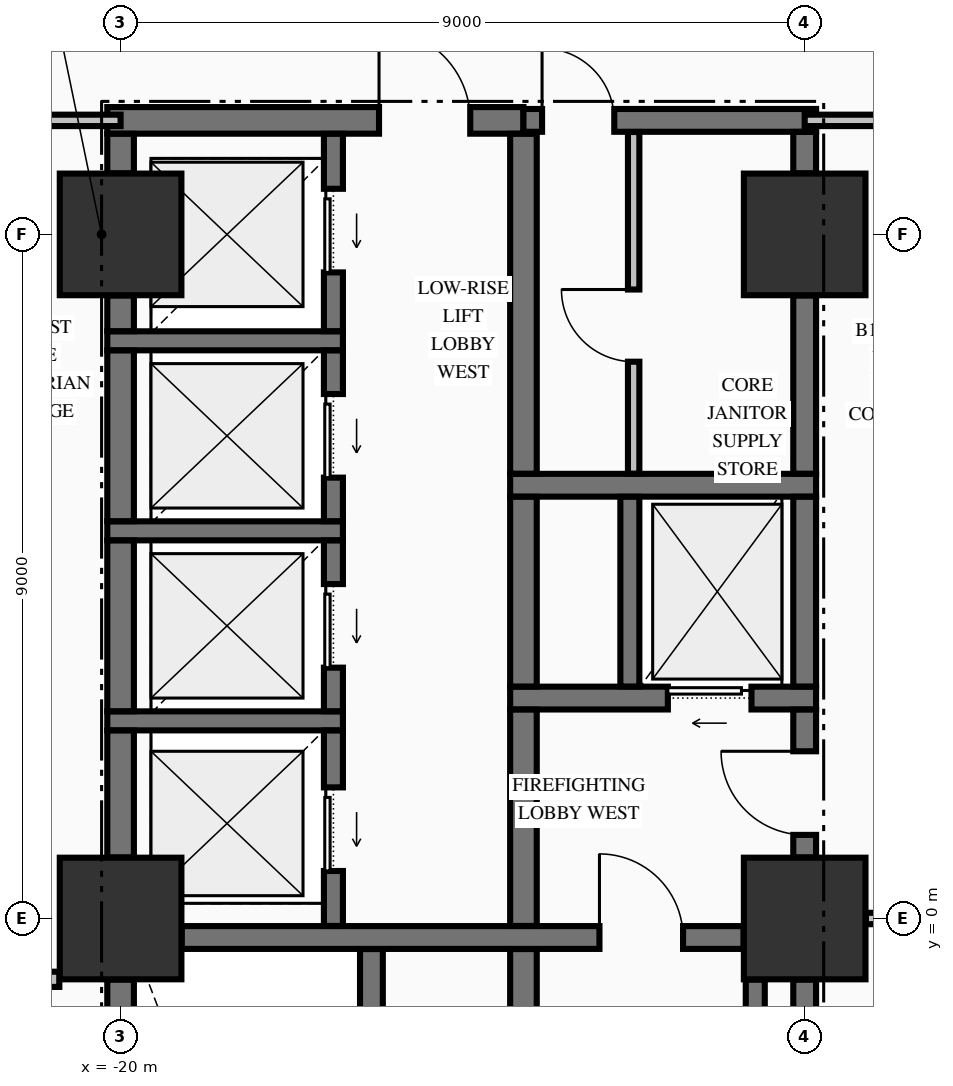
"""IFC4 building model, lengths in metres.
Left out: names, types, materials, properties, quantities, classifications, styles, units other than length and angle.
Written with IfcOpenShell. Run it as: python <this file> out.ifc"""

import sys

from ifc_helpers import new_model, si_unit, direction, frame, frame_2d, origin, origin_2d, place, context, subcontext, project, spatial, rectangle, extrude, element, fill, save


model = new_model("IFC4")
c1 = context("Model", 3, precision=1e-05, world=origin(), true_north=direction((0.0, 1.0)))
c2 = subcontext(c1, "Body", "Model", "MODEL_VIEW")
j1 = project(units=[si_unit("LENGTHUNIT", "METRE"), si_unit("PLANEANGLEUNIT", "RADIAN")], contexts=[c1])
p1 = place(None, origin())
s1 = spatial("IfcSite", under=j1, at=p1, CompositionType="ELEMENT")
p2 = place(p1, origin())
s2 = spatial("IfcBuilding", under=s1, at=p2, CompositionType="ELEMENT")
p3 = place(p2, frame((0.0, 0.0, -4.55)))
s3 = spatial("IfcBuildingStorey", under=s2, at=p3, CompositionType="ELEMENT", Elevation=-4.55)
for number, where, z_axis, x_axis in (
    (1, (-20.0, 0.0, 0.0), (0.0, 0.0, 1.0), (1.0, 0.0, 0.0)),
    (2, (-20.0, 9.0, 0.0), (0.0, 0.0, 1.0), (1.0, 0.0, 0.0)),
    (3, (-11.0, 0.0, 0.0), (0.0, 0.0, 1.0), (1.0, 0.0, 0.0)),
    (4, (-11.0, 9.0, 0.0), (0.0, 0.0, 1.0), (1.0, 0.0, 0.0)),
):
    element("IfcColumn", number, at=place(p3, frame(where, z_axis=z_axis, x_axis=x_axis)), inside=s3, PredefinedType="COLUMN", context=c2, shape_type="SweptSolid", body=[
        extrude(rectangle(XDim=1.6, YDim=1.6, at=origin_2d()), origin(), (0.0, 0.0, 1.0), 4.2),
    ])
p4 = place(p3, frame((-19.196, -0.25, 0.0), z_axis=(0.0, 0.0, 1.0), x_axis=(1.0, 0.0, 0.0)))
e5 = element("IfcWall", 5, at=p4, inside=s3, PredefinedType="SHEAR", context=c2, shape_type="SweptSolid", body=[
    extrude(rectangle(XDim=7.392, YDim=0.3, at=frame_2d((3.696, 0.0))), origin(), (0.0, 0.0, 1.0), 4.2),
])
p5 = place(p4, frame((5.496, 0.0, 0.0)))
e6 = element("IfcOpeningElement", 6, at=p5, cuts=e5, PredefinedType="OPENING", context=c2, shape_type="SweptSolid", body=[
    extrude(rectangle(XDim=1.1, YDim=2.15, at=frame_2d((0.55, 1.075))), frame((0.0, 0.16, 0.0), z_axis=(0.0, -1.0, 0.0), x_axis=(1.0, 0.0, 0.0)), (0.0, 0.0, 1.0), 0.32),
])
p6 = place(p3, frame((-20.175, 2.6, 0.0), z_axis=(0.0, 0.0, 1.0), x_axis=(1.0, 0.0, 0.0)))
e7 = element("IfcWall", 7, at=p6, inside=s3, PredefinedType="SOLIDWALL", context=c2, shape_type="SweptSolid", body=[
    extrude(rectangle(XDim=3.1, YDim=0.25, at=frame_2d((1.55, 0.0))), origin(), (0.0, 0.0, 1.0), 4.2),
])
p7 = place(p3, frame((-14.875, 2.9, 0.0), z_axis=(0.0, 0.0, 1.0), x_axis=(1.0, 0.0, 0.0)))
e8 = element("IfcWall", 8, at=p7, inside=s3, PredefinedType="SHEAR", context=c2, shape_type="SweptSolid", body=[
    extrude(rectangle(XDim=4.025, YDim=0.3, at=frame_2d((2.012, 0.0))), origin(), (0.0, 0.0, 1.0), 4.2),
])
p8 = place(p7, frame((2.075, 0.0, 0.0)))
e9 = element("IfcOpeningElement", 9, at=p8, cuts=e8, PredefinedType="OPENING", context=c2, shape_type="SweptSolid", body=[
    extrude(rectangle(XDim=1.1, YDim=2.2, at=frame_2d((0.55, 1.1))), frame((0.0, 0.16, 0.0), z_axis=(0.0, -1.0, 0.0), x_axis=(1.0, 0.0, 0.0)), (0.0, 0.0, 1.0), 0.32),
])
p9 = place(p3, frame((-20.175, 5.1, 0.0), z_axis=(0.0, 0.0, 1.0), x_axis=(1.0, 0.0, 0.0)))
e10 = element("IfcWall", 10, at=p9, inside=s3, PredefinedType="SOLIDWALL", context=c2, shape_type="SweptSolid", body=[
    extrude(rectangle(XDim=3.1, YDim=0.25, at=frame_2d((1.55, 0.0))), origin(), (0.0, 0.0, 1.0), 4.2),
])
p10 = place(p3, frame((-14.875, 5.7, 0.0), z_axis=(0.0, 0.0, 1.0), x_axis=(1.0, 0.0, 0.0)))
e11 = element("IfcWall", 11, at=p10, inside=s3, PredefinedType="SHEAR", context=c2, shape_type="SweptSolid", body=[
    extrude(rectangle(XDim=4.025, YDim=0.3, at=frame_2d((2.012, 0.0))), origin(), (0.0, 0.0, 1.0), 4.2),
])
p11 = place(p3, frame((-20.175, 7.6, 0.0), z_axis=(0.0, 0.0, 1.0), x_axis=(1.0, 0.0, 0.0)))
e12 = element("IfcWall", 12, at=p11, inside=s3, PredefinedType="SOLIDWALL", context=c2, shape_type="SweptSolid", body=[
    extrude(rectangle(XDim=3.1, YDim=0.25, at=frame_2d((1.55, 0.0))), origin(), (0.0, 0.0, 1.0), 4.2),
])
p12 = place(p3, frame((-20.175, 10.5, 0.0), z_axis=(0.0, 0.0, 1.0), x_axis=(1.0, 0.0, 0.0)))
e13 = element("IfcWall", 13, at=p12, inside=s3, PredefinedType="SHEAR", context=c2, shape_type="SweptSolid", body=[
    extrude(rectangle(XDim=5.475, YDim=0.35, at=frame_2d((2.738, 0.0))), origin(), (0.0, 0.0, 1.0), 4.2),
])
p13 = place(p12, frame((3.575, 0.0, 0.0)))
e14 = element("IfcOpeningElement", 14, at=p13, cuts=e13, PredefinedType="OPENING", context=c2, shape_type="SweptSolid", body=[
    extrude(rectangle(XDim=1.2, YDim=2.15, at=frame_2d((0.6, 1.075))), frame((0.0, 0.185, 0.0), z_axis=(0.0, -1.0, 0.0), x_axis=(1.0, 0.0, 0.0)), (0.0, 0.0, 1.0), 0.37),
])
p14 = place(p3, frame((-14.7, 10.5, 0.0), z_axis=(0.0, 0.0, 1.0), x_axis=(1.0, 0.0, 0.0)))
e15 = element("IfcWall", 15, at=p14, inside=s3, PredefinedType="SHEAR", context=c2, shape_type="SweptSolid", body=[
    extrude(rectangle(XDim=3.85, YDim=0.3, at=frame_2d((1.925, 0.0))), origin(), (0.0, 0.0, 1.0), 4.2),
])
p15 = place(p14, frame((0.245, 0.0, 0.0)))
e16 = element("IfcOpeningElement", 16, at=p15, cuts=e15, PredefinedType="OPENING", context=c2, shape_type="SweptSolid", body=[
    extrude(rectangle(XDim=0.95, YDim=2.15, at=frame_2d((0.475, 1.075))), frame((0.0, 0.16, 0.0), z_axis=(0.0, -1.0, 0.0), x_axis=(1.0, 0.0, 0.0)), (0.0, 0.0, 1.0), 0.32),
])
p16 = place(p3, frame((-22.475, -0.8, 0.0), z_axis=(0.0, 0.0, 1.0), x_axis=(1.0, 0.0, 0.0)))
e17 = element("IfcWall", 17, at=p16, inside=s3, PredefinedType="PARTITIONING", context=c2, shape_type="SweptSolid", body=[
    extrude(rectangle(XDim=1.669, YDim=0.2, at=frame_2d((0.834, 0.0))), origin(), (0.0, 0.0, 1.0), 4.2),
])
p17 = place(p16, frame((0.425, 0.0, 0.0)))
e18 = element("IfcOpeningElement", 18, at=p17, cuts=e17, PredefinedType="OPENING", context=c2, shape_type="SweptSolid", body=[
    extrude(rectangle(XDim=1.0, YDim=2.15, at=frame_2d((0.5, 1.075))), frame((0.0, 0.11, 0.0), z_axis=(0.0, -1.0, 0.0), x_axis=(1.0, 0.0, 0.0)), (0.0, 0.0, 1.0), 0.22),
])
p18 = place(p3, frame((-10.194, 0.0, 0.0), z_axis=(0.0, 0.0, 1.0), x_axis=(1.0, 0.0, 0.0)))
e19 = element("IfcWall", 19, at=p18, inside=s3, PredefinedType="PARTITIONING", context=c2, shape_type="SweptSolid", body=[
    extrude(rectangle(XDim=0.988, YDim=0.15, at=frame_2d((0.494, 0.0))), origin(), (0.0, 0.0, 1.0), 3.242),
])
p19 = place(p3, frame((-22.475, 10.5, 0.0), z_axis=(0.0, 0.0, 1.0), x_axis=(1.0, 0.0, 0.0)))
e20 = element("IfcWall", 20, at=p19, inside=s3, PredefinedType="PARTITIONING", context=c2, shape_type="SweptSolid", body=[
    extrude(rectangle(XDim=2.475, YDim=0.15, at=frame_2d((1.238, 0.0))), origin(), (0.0, 0.0, 1.0), 4.2),
])
p20 = place(p19, frame((0.43, 0.0, 0.0)))
e21 = element("IfcOpeningElement", 21, at=p20, cuts=e20, PredefinedType="OPENING", context=c2, shape_type="SweptSolid", body=[
    extrude(rectangle(XDim=1.05, YDim=2.15, at=frame_2d((0.525, 1.075))), frame((0.0, 0.085, 0.0), z_axis=(0.0, -1.0, 0.0), x_axis=(1.0, 0.0, 0.0)), (0.0, 0.0, 1.0), 0.17),
])
p21 = place(p3, frame((-11.0, 10.5, 0.0), z_axis=(0.0, 0.0, 1.0), x_axis=(1.0, 0.0, 0.0)))
e22 = element("IfcWall", 22, at=p21, inside=s3, PredefinedType="PARTITIONING", context=c2, shape_type="SweptSolid", body=[
    extrude(rectangle(XDim=22.0, YDim=0.15, at=frame_2d((11.0, 0.0))), origin(), (0.0, 0.0, 1.0), 4.2),
])
p22 = place(p21, frame((0.995, 0.0, 0.0)))
e23 = element("IfcOpeningElement", 23, at=p22, cuts=e22, PredefinedType="OPENING", context=c2, shape_type="SweptSolid", body=[
    extrude(rectangle(XDim=1.05, YDim=2.15, at=frame_2d((0.525, 1.075))), frame((0.0, 0.085, 0.0), z_axis=(0.0, -1.0, 0.0), x_axis=(1.0, 0.0, 0.0)), (0.0, 0.0, 1.0), 0.17),
])
p23 = place(p21, frame((19.955, 0.0, 0.0)))
e24 = element("IfcOpeningElement", 24, at=p23, cuts=e22, PredefinedType="OPENING", context=c2, shape_type="SweptSolid", body=[
    extrude(rectangle(XDim=1.05, YDim=2.15, at=frame_2d((0.525, 1.075))), frame((0.0, 0.085, 0.0), z_axis=(0.0, -1.0, 0.0), x_axis=(1.0, 0.0, 0.0)), (0.0, 0.0, 1.0), 0.17),
])
p24 = place(p3, frame((-20.0, -8.196, 0.0), z_axis=(0.0, 0.0, 1.0), x_axis=(0.0, 1.0, 0.0)))
e25 = element("IfcWall", 25, at=p24, inside=s3, PredefinedType="SHEAR", context=c2, shape_type="SweptSolid", body=[
    extrude(rectangle(XDim=7.392, YDim=0.35, at=frame_2d((3.696, 0.0))), origin(), (0.0, 0.0, 1.0), 4.2),
])
p25 = place(p3, frame((-20.0, 0.804, 0.0), z_axis=(0.0, 0.0, 1.0), x_axis=(0.0, 1.0, 0.0)))
e26 = element("IfcWall", 26, at=p25, inside=s3, PredefinedType="SHEAR", context=c2, shape_type="SweptSolid", body=[
    extrude(rectangle(XDim=1.669, YDim=0.35, at=frame_2d((0.834, 0.0))), origin(), (0.0, 0.0, 1.0), 4.2),
])
for number, where, z_axis, x_axis in (
    (27, (-20.0, 2.727, 0.0), (0.0, 0.0, 1.0), (0.0, 1.0, 0.0)),
    (28, (-20.0, 5.227, 0.0), (0.0, 0.0, 1.0), (0.0, 1.0, 0.0)),
):
    element("IfcWall", number, at=place(p3, frame(where, z_axis=z_axis, x_axis=x_axis)), inside=s3, PredefinedType="SHEAR", context=c2, shape_type="SweptSolid", body=[
        extrude(rectangle(XDim=2.246, YDim=0.35, at=frame_2d((1.123, 0.0))), origin(), (0.0, 0.0, 1.0), 4.2),
    ])
p26 = place(p3, frame((-20.0, 7.727, 0.0), z_axis=(0.0, 0.0, 1.0), x_axis=(0.0, 1.0, 0.0)))
e29 = element("IfcWall", 29, at=p26, inside=s3, PredefinedType="SHEAR", context=c2, shape_type="SweptSolid", body=[
    extrude(rectangle(XDim=0.469, YDim=0.35, at=frame_2d((0.234, 0.0))), origin(), (0.0, 0.0, 1.0), 4.2),
])
p27 = place(p3, frame((-20.0, 9.804, 0.0), z_axis=(0.0, 0.0, 1.0), x_axis=(0.0, 1.0, 0.0)))
e30 = element("IfcWall", 30, at=p27, inside=s3, PredefinedType="SHEAR", context=c2, shape_type="SweptSolid", body=[
    extrude(rectangle(XDim=0.519, YDim=0.35, at=frame_2d((0.26, 0.0))), origin(), (0.0, 0.0, 1.0), 4.2),
])
p28 = place(p3, frame((-17.2, -0.098, 0.0), z_axis=(0.0, 0.0, 1.0), x_axis=(0.0, 1.0, 0.0)))
e31 = element("IfcWall", 31, at=p28, inside=s3, PredefinedType="SOLIDWALL", context=c2, shape_type="SweptSolid", body=[
    extrude(rectangle(XDim=2.571, YDim=0.25, at=frame_2d((1.285, 0.0))), origin(), (0.0, 0.0, 1.0), 4.2),
])
p29 = place(p28, frame((0.723, 0.0, 0.0)))
e32 = element("IfcOpeningElement", 32, at=p29, cuts=e31, PredefinedType="OPENING", context=c2, shape_type="SweptSolid", body=[
    extrude(rectangle(XDim=1.1, YDim=2.2, at=frame_2d((0.55, 1.1))), frame((0.0, 0.135, 0.0), z_axis=(0.0, -1.0, 0.0), x_axis=(1.0, 0.0, 0.0)), (0.0, 0.0, 1.0), 0.27),
])
p30 = place(p3, frame((-17.2, 2.727, 0.0), z_axis=(0.0, 0.0, 1.0), x_axis=(0.0, 1.0, 0.0)))
e33 = element("IfcWall", 33, at=p30, inside=s3, PredefinedType="SOLIDWALL", context=c2, shape_type="SweptSolid", body=[
    extrude(rectangle(XDim=2.246, YDim=0.25, at=frame_2d((1.123, 0.0))), origin(), (0.0, 0.0, 1.0), 4.2),
])
p31 = place(p30, frame((0.573, 0.0, 0.0)))
e34 = element("IfcOpeningElement", 34, at=p31, cuts=e33, PredefinedType="OPENING", context=c2, shape_type="SweptSolid", body=[
    extrude(rectangle(XDim=1.1, YDim=2.2, at=frame_2d((0.55, 1.1))), frame((0.0, 0.135, 0.0), z_axis=(0.0, -1.0, 0.0), x_axis=(1.0, 0.0, 0.0)), (0.0, 0.0, 1.0), 0.27),
])
p32 = place(p3, frame((-17.2, 5.227, 0.0), z_axis=(0.0, 0.0, 1.0), x_axis=(0.0, 1.0, 0.0)))
e35 = element("IfcWall", 35, at=p32, inside=s3, PredefinedType="SOLIDWALL", context=c2, shape_type="SweptSolid", body=[
    extrude(rectangle(XDim=2.246, YDim=0.25, at=frame_2d((1.123, 0.0))), origin(), (0.0, 0.0, 1.0), 4.2),
])
p33 = place(p32, frame((0.573, 0.0, 0.0)))
e36 = element("IfcOpeningElement", 36, at=p33, cuts=e35, PredefinedType="OPENING", context=c2, shape_type="SweptSolid", body=[
    extrude(rectangle(XDim=1.1, YDim=2.2, at=frame_2d((0.55, 1.1))), frame((0.0, 0.135, 0.0), z_axis=(0.0, -1.0, 0.0), x_axis=(1.0, 0.0, 0.0)), (0.0, 0.0, 1.0), 0.27),
])
p34 = place(p3, frame((-17.2, 7.727, 0.0), z_axis=(0.0, 0.0, 1.0), x_axis=(0.0, 1.0, 0.0)))
e37 = element("IfcWall", 37, at=p34, inside=s3, PredefinedType="SOLIDWALL", context=c2, shape_type="SweptSolid", body=[
    extrude(rectangle(XDim=2.596, YDim=0.25, at=frame_2d((1.298, 0.0))), origin(), (0.0, 0.0, 1.0), 4.2),
])
p35 = place(p34, frame((0.773, 0.0, 0.0)))
e38 = element("IfcOpeningElement", 38, at=p35, cuts=e37, PredefinedType="OPENING", context=c2, shape_type="SweptSolid", body=[
    extrude(rectangle(XDim=1.1, YDim=2.2, at=frame_2d((0.55, 1.1))), frame((0.0, 0.135, 0.0), z_axis=(0.0, -1.0, 0.0), x_axis=(1.0, 0.0, 0.0)), (0.0, 0.0, 1.0), 0.27),
])
p36 = place(p3, frame((-16.7, -9.773, 0.0), z_axis=(0.0, 0.0, 1.0), x_axis=(0.0, 1.0, 0.0)))
e39 = element("IfcWall", 39, at=p36, inside=s3, PredefinedType="SHEAR", context=c2, shape_type="SweptSolid", body=[
    extrude(rectangle(XDim=9.371, YDim=0.3, at=frame_2d((4.686, 0.0))), origin(), (0.0, 0.0, 1.0), 4.2),
])
p37 = place(p3, frame((-14.7, -9.773, 0.0), z_axis=(0.0, 0.0, 1.0), x_axis=(0.0, 1.0, 0.0)))
e40 = element("IfcWall", 40, at=p37, inside=s3, PredefinedType="SHEAR", context=c2, shape_type="SweptSolid", body=[
    extrude(rectangle(XDim=9.371, YDim=0.35, at=frame_2d((4.686, 0.0))), origin(), (0.0, 0.0, 1.0), 4.2),
])
p38 = place(p3, frame((-14.7, -0.098, 0.0), z_axis=(0.0, 0.0, 1.0), x_axis=(0.0, 1.0, 0.0)))
e41 = element("IfcWall", 41, at=p38, inside=s3, PredefinedType="SHEAR", context=c2, shape_type="SweptSolid", body=[
    extrude(rectangle(XDim=2.846, YDim=0.35, at=frame_2d((1.423, 0.0))), origin(), (0.0, 0.0, 1.0), 4.2),
])
p39 = place(p3, frame((-14.7, 3.052, 0.0), z_axis=(0.0, 0.0, 1.0), x_axis=(0.0, 1.0, 0.0)))
e42 = element("IfcWall", 42, at=p39, inside=s3, PredefinedType="SHEAR", context=c2, shape_type="SweptSolid", body=[
    extrude(rectangle(XDim=2.496, YDim=0.35, at=frame_2d((1.248, 0.0))), origin(), (0.0, 0.0, 1.0), 4.2),
])
p40 = place(p3, frame((-14.7, 5.852, 0.0), z_axis=(0.0, 0.0, 1.0), x_axis=(0.0, 1.0, 0.0)))
e43 = element("IfcWall", 43, at=p40, inside=s3, PredefinedType="SHEAR", context=c2, shape_type="SweptSolid", body=[
    extrude(rectangle(XDim=4.471, YDim=0.35, at=frame_2d((2.235, 0.0))), origin(), (0.0, 0.0, 1.0), 4.2),
])
p41 = place(p3, frame((-13.3, 3.052, 0.0), z_axis=(0.0, 0.0, 1.0), x_axis=(0.0, 1.0, 0.0)))
e44 = element("IfcWall", 44, at=p41, inside=s3, PredefinedType="SOLIDWALL", context=c2, shape_type="SweptSolid", body=[
    extrude(rectangle(XDim=2.496, YDim=0.25, at=frame_2d((1.248, 0.0))), origin(), (0.0, 0.0, 1.0), 4.2),
])
p42 = place(p3, frame((-11.65, -8.196, 0.0), z_axis=(0.0, 0.0, 1.0), x_axis=(0.0, 1.0, 0.0)))
e45 = element("IfcWall", 45, at=p42, inside=s3, PredefinedType="SOLIDWALL", context=c2, shape_type="SweptSolid", body=[
    extrude(rectangle(XDim=7.392, YDim=0.25, at=frame_2d((3.696, 0.0))), origin(), (0.0, 0.0, 1.0), 4.2),
])
p43 = place(p3, frame((-11.0, -8.196, 0.0), z_axis=(0.0, 0.0, 1.0), x_axis=(0.0, 1.0, 0.0)))
e46 = element("IfcWall", 46, at=p43, inside=s3, PredefinedType="SHEAR", context=c2, shape_type="SweptSolid", body=[
    extrude(rectangle(XDim=7.392, YDim=0.3, at=frame_2d((3.696, 0.0))), origin(), (0.0, 0.0, 1.0), 4.2),
])
p44 = place(p3, frame((-11.0, 0.804, 0.0), z_axis=(0.0, 0.0, 1.0), x_axis=(0.0, 1.0, 0.0)))
e47 = element("IfcWall", 47, at=p44, inside=s3, PredefinedType="SHEAR", context=c2, shape_type="SweptSolid", body=[
    extrude(rectangle(XDim=1.944, YDim=0.3, at=frame_2d((0.972, 0.0))), origin(), (0.0, 0.0, 1.0), 4.2),
])
p45 = place(p44, frame((0.296, 0.0, 0.0)))
e48 = element("IfcOpeningElement", 48, at=p45, cuts=e47, PredefinedType="OPENING", context=c2, shape_type="SweptSolid", body=[
    extrude(rectangle(XDim=1.1, YDim=2.15, at=frame_2d((0.55, 1.075))), frame((0.0, 0.16, 0.0), z_axis=(0.0, -1.0, 0.0), x_axis=(1.0, 0.0, 0.0)), (0.0, 0.0, 1.0), 0.32),
])
p46 = place(p3, frame((-11.0, 3.052, 0.0), z_axis=(0.0, 0.0, 1.0), x_axis=(0.0, 1.0, 0.0)))
e49 = element("IfcWall", 49, at=p46, inside=s3, PredefinedType="SHEAR", context=c2, shape_type="SweptSolid", body=[
    extrude(rectangle(XDim=2.496, YDim=0.3, at=frame_2d((1.248, 0.0))), origin(), (0.0, 0.0, 1.0), 4.2),
])
p47 = place(p3, frame((-11.0, 5.852, 0.0), z_axis=(0.0, 0.0, 1.0), x_axis=(0.0, 1.0, 0.0)))
e50 = element("IfcWall", 50, at=p47, inside=s3, PredefinedType="SHEAR", context=c2, shape_type="SweptSolid", body=[
    extrude(rectangle(XDim=2.344, YDim=0.3, at=frame_2d((1.172, 0.0))), origin(), (0.0, 0.0, 1.0), 4.2),
])
p48 = place(p3, frame((-11.0, 9.804, 0.0), z_axis=(0.0, 0.0, 1.0), x_axis=(0.0, 1.0, 0.0)))
e51 = element("IfcWall", 51, at=p48, inside=s3, PredefinedType="SHEAR", context=c2, shape_type="SweptSolid", body=[
    extrude(rectangle(XDim=0.544, YDim=0.3, at=frame_2d((0.272, 0.0))), origin(), (0.0, 0.0, 1.0), 4.2),
])
p49 = place(p3, frame((-13.25, 5.853, 0.0), z_axis=(0.0, 0.0, 1.0), x_axis=(0.0, 1.0, 0.0)))
e52 = element("IfcWall", 52, at=p49, inside=s3, PredefinedType="PARTITIONING", context=c2, shape_type="SweptSolid", body=[
    extrude(rectangle(XDim=4.494, YDim=0.15, at=frame_2d((2.247, 0.0))), origin(), (0.0, 0.0, 1.0), 4.2),
])
p50 = place(p49, frame((1.472, 0.0, 0.0)))
e53 = element("IfcOpeningElement", 53, at=p50, cuts=e52, PredefinedType="OPENING", context=c2, shape_type="SweptSolid", body=[
    extrude(rectangle(XDim=0.95, YDim=2.15, at=frame_2d((0.475, 1.075))), frame((0.0, 0.085, 0.0), z_axis=(0.0, -1.0, 0.0), x_axis=(1.0, 0.0, 0.0)), (0.0, 0.0, 1.0), 0.17),
])
p51 = place(p5, origin())
e54 = element("IfcDoor", 54, at=p51, inside=s3, OperationType="SINGLE_SWING_LEFT", PredefinedType="DOOR", context=c2, shape_type="SweptSolid", body=[
    extrude(rectangle(XDim=1.1, YDim=2.15, at=frame_2d((0.55, 1.075))), frame((0.0, 0.025, 0.0), z_axis=(0.0, -1.0, 0.0), x_axis=(1.0, 0.0, 0.0)), (0.0, 0.0, 1.0), 0.05),
])
fill(e6, e54)
p52 = place(p45, origin())
e55 = element("IfcDoor", 55, at=p52, inside=s3, OperationType="SINGLE_SWING_RIGHT", PredefinedType="DOOR", context=c2, shape_type="SweptSolid", body=[
    extrude(rectangle(XDim=1.1, YDim=2.15, at=frame_2d((0.55, 1.075))), frame((0.0, 0.025, 0.0), z_axis=(0.0, -1.0, 0.0), x_axis=(1.0, 0.0, 0.0)), (0.0, 0.0, 1.0), 0.05),
])
fill(e48, e55)
p53 = place(p8, origin())
e56 = element("IfcDoor", 56, at=p53, inside=s3, OperationType="SLIDING_TO_LEFT", PredefinedType="DOOR", context=c2, shape_type="SweptSolid", body=[
    extrude(rectangle(XDim=1.1, YDim=2.2, at=frame_2d((0.55, 1.1))), frame((0.0, 0.025, 0.0), z_axis=(0.0, -1.0, 0.0), x_axis=(1.0, 0.0, 0.0)), (0.0, 0.0, 1.0), 0.05),
])
fill(e9, e56)
p54 = place(p15, origin())
e57 = element("IfcDoor", 57, at=p54, inside=s3, OperationType="SINGLE_SWING_LEFT", PredefinedType="DOOR", context=c2, shape_type="SweptSolid", body=[
    extrude(rectangle(XDim=0.95, YDim=2.15, at=frame_2d((0.475, 1.075))), frame((0.0, 0.025, 0.0), z_axis=(0.0, -1.0, 0.0), x_axis=(1.0, 0.0, 0.0)), (0.0, 0.0, 1.0), 0.05),
])
fill(e16, e57)
p55 = place(p50, origin())
e58 = element("IfcDoor", 58, at=p55, inside=s3, OperationType="SINGLE_SWING_RIGHT", PredefinedType="DOOR", context=c2, shape_type="SweptSolid", body=[
    extrude(rectangle(XDim=0.95, YDim=2.15, at=frame_2d((0.475, 1.075))), frame((0.0, 0.025, 0.0), z_axis=(0.0, -1.0, 0.0), x_axis=(1.0, 0.0, 0.0)), (0.0, 0.0, 1.0), 0.05),
])
fill(e53, e58)
p56 = place(p13, origin())
e59 = element("IfcDoor", 59, at=p56, inside=s3, OperationType="SINGLE_SWING_LEFT", PredefinedType="DOOR", context=c2, shape_type="SweptSolid", body=[
    extrude(rectangle(XDim=1.2, YDim=2.15, at=frame_2d((0.6, 1.075))), frame((0.0, 0.025, 0.0), z_axis=(0.0, -1.0, 0.0), x_axis=(1.0, 0.0, 0.0)), (0.0, 0.0, 1.0), 0.05),
])
fill(e14, e59)
p57 = place(p29, origin())
e60 = element("IfcDoor", 60, at=p57, inside=s3, OperationType="SLIDING_TO_LEFT", PredefinedType="DOOR", context=c2, shape_type="SweptSolid", body=[
    extrude(rectangle(XDim=1.1, YDim=2.2, at=frame_2d((0.55, 1.1))), frame((0.0, 0.025, 0.0), z_axis=(0.0, -1.0, 0.0), x_axis=(1.0, 0.0, 0.0)), (0.0, 0.0, 1.0), 0.05),
])
fill(e32, e60)
p58 = place(p31, origin())
e61 = element("IfcDoor", 61, at=p58, inside=s3, OperationType="SLIDING_TO_LEFT", PredefinedType="DOOR", context=c2, shape_type="SweptSolid", body=[
    extrude(rectangle(XDim=1.1, YDim=2.2, at=frame_2d((0.55, 1.1))), frame((0.0, 0.025, 0.0), z_axis=(0.0, -1.0, 0.0), x_axis=(1.0, 0.0, 0.0)), (0.0, 0.0, 1.0), 0.05),
])
fill(e34, e61)
p59 = place(p33, origin())
e62 = element("IfcDoor", 62, at=p59, inside=s3, OperationType="SLIDING_TO_LEFT", PredefinedType="DOOR", context=c2, shape_type="SweptSolid", body=[
    extrude(rectangle(XDim=1.1, YDim=2.2, at=frame_2d((0.55, 1.1))), frame((0.0, 0.025, 0.0), z_axis=(0.0, -1.0, 0.0), x_axis=(1.0, 0.0, 0.0)), (0.0, 0.0, 1.0), 0.05),
])
fill(e36, e62)
p60 = place(p35, origin())
e63 = element("IfcDoor", 63, at=p60, inside=s3, OperationType="SLIDING_TO_LEFT", PredefinedType="DOOR", context=c2, shape_type="SweptSolid", body=[
    extrude(rectangle(XDim=1.1, YDim=2.2, at=frame_2d((0.55, 1.1))), frame((0.0, 0.025, 0.0), z_axis=(0.0, -1.0, 0.0), x_axis=(1.0, 0.0, 0.0)), (0.0, 0.0, 1.0), 0.05),
])
fill(e38, e63)
save(model, sys.argv[1])
